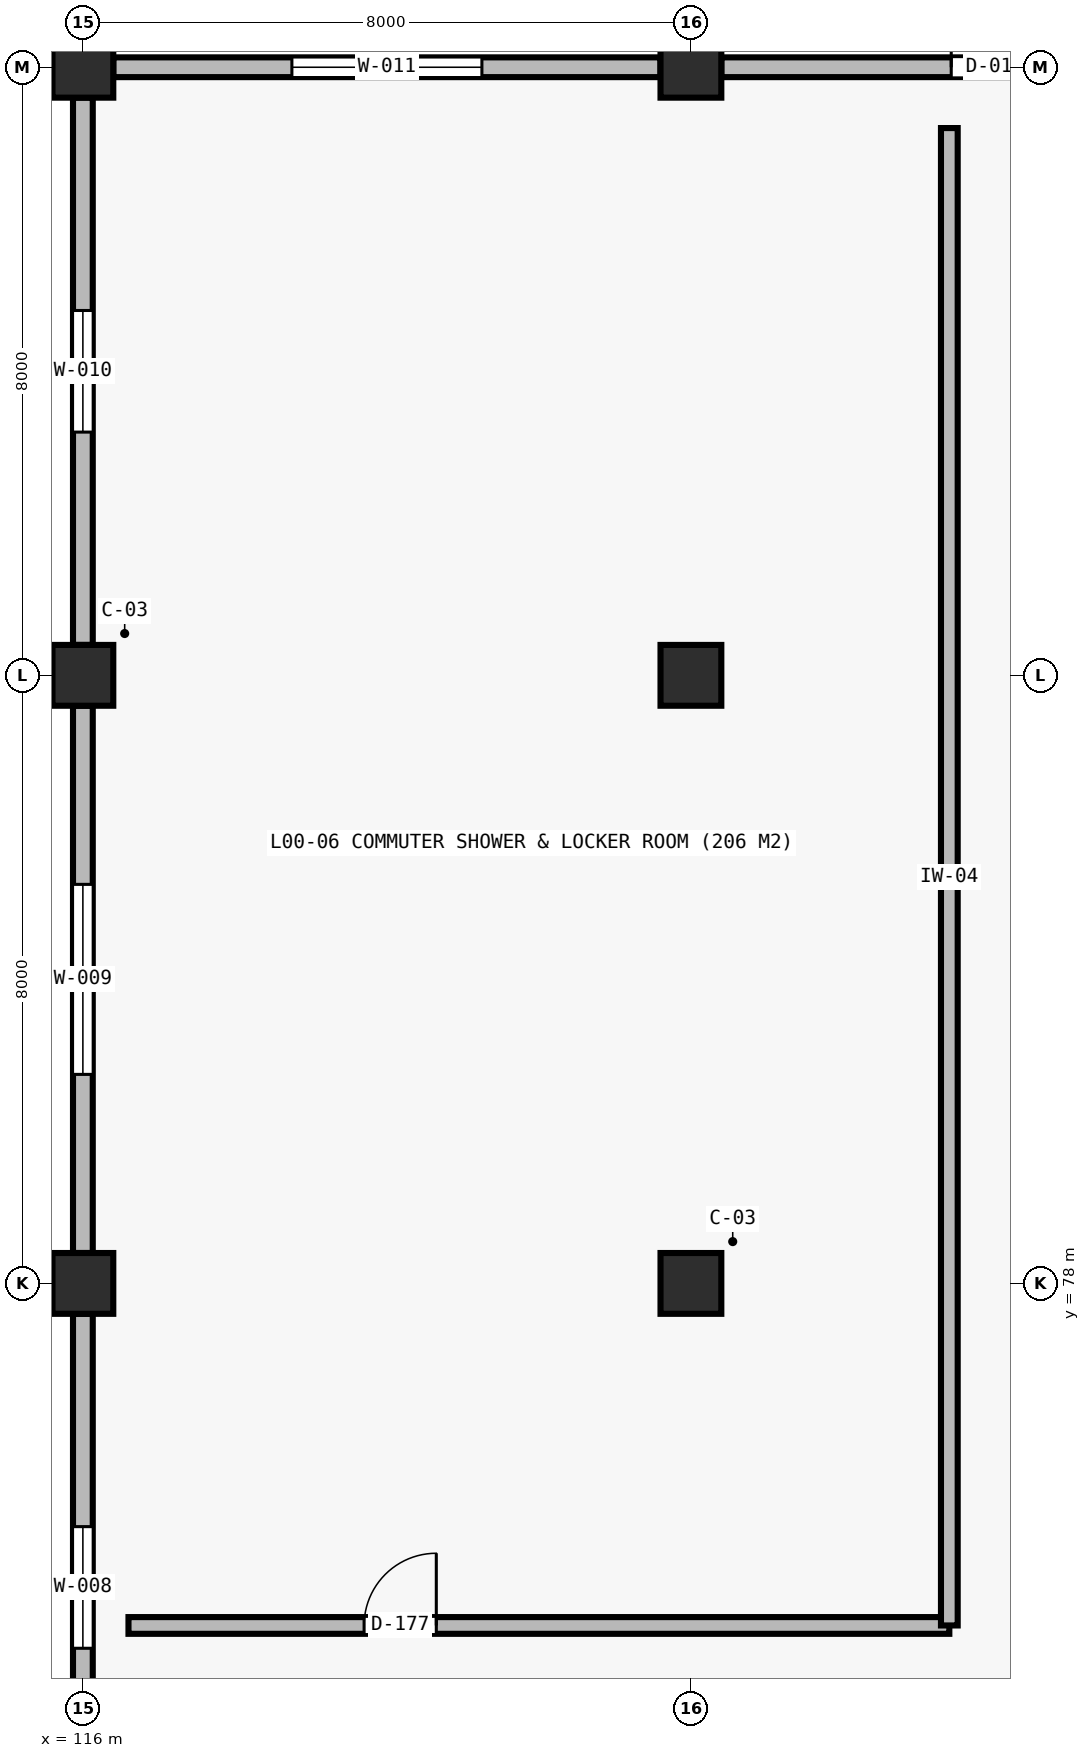
"""IFC4 building model, lengths in metres.
Left out: names, types, materials, properties, quantities, classifications, styles, units other than length and angle.
Written with IfcOpenShell. Run it as: python <this file> out.ifc"""

import sys

from ifc_helpers import new_model, si_unit, direction, frame, frame_2d, origin, origin_2d, place, context, subcontext, project, spatial, rectangle, extrude, element, fill, save


model = new_model("IFC4")
c1 = context("Model", 3, precision=1e-05, world=origin(), true_north=direction((0.0, 1.0)))
c2 = subcontext(c1, "Body", "Model", "MODEL_VIEW")
j1 = project(units=[si_unit("LENGTHUNIT", "METRE"), si_unit("PLANEANGLEUNIT", "RADIAN")], contexts=[c1])
p1 = place(None, origin())
s1 = spatial("IfcSite", under=j1, at=p1, CompositionType="ELEMENT")
p2 = place(p1, origin())
s2 = spatial("IfcBuilding", under=s1, at=p2, CompositionType="ELEMENT")
p3 = place(p2, origin())
s3 = spatial("IfcBuildingStorey", under=s2, at=p3, CompositionType="ELEMENT", Elevation=0.0)
for number, where, z_axis, x_axis in (
    (1, (116.0, 78.0, 0.0), (0.0, 0.0, 1.0), (1.0, 0.0, 0.0)),
    (2, (116.0, 86.0, 0.0), (0.0, 0.0, 1.0), (1.0, 0.0, 0.0)),
    (3, (116.0, 94.0, 0.0), (0.0, 0.0, 1.0), (1.0, 0.0, 0.0)),
    (4, (124.0, 78.0, 0.0), (0.0, 0.0, 1.0), (1.0, 0.0, 0.0)),
    (5, (124.0, 86.0, 0.0), (0.0, 0.0, 1.0), (1.0, 0.0, 0.0)),
    (6, (124.0, 94.0, 0.0), (0.0, 0.0, 1.0), (1.0, 0.0, 0.0)),
):
    element("IfcColumn", number, at=place(p3, frame(where, z_axis=z_axis, x_axis=x_axis)), inside=s3, PredefinedType="COLUMN", context=c2, shape_type="SweptSolid", body=[
        extrude(rectangle(XDim=0.8, YDim=0.8, at=origin_2d()), origin(), (0.0, 0.0, 1.0), 6.02),
    ])
p4 = place(p3, frame((116.0, 70.4, 0.0), z_axis=(0.0, 0.0, 1.0), x_axis=(0.0, 1.0, 0.0)))
e7 = element("IfcWall", 7, at=p4, inside=s3, PredefinedType="STANDARD", context=c2, shape_type="SweptSolid", body=[
    extrude(rectangle(XDim=7.2, YDim=0.26, at=frame_2d((3.6, 0.0))), origin(), (0.0, 0.0, 1.0), 5.408),
])
p5 = place(p4, frame((2.8, 0.0, 0.95)))
e8 = element("IfcOpeningElement", 8, at=p5, cuts=e7, PredefinedType="OPENING", context=c2, shape_type="SweptSolid", body=[
    extrude(rectangle(XDim=1.6, YDim=2.2, at=frame_2d((0.8, 1.1))), frame((0.0, 0.14, 0.0), z_axis=(0.0, -1.0, 0.0), x_axis=(1.0, 0.0, 0.0)), (0.0, 0.0, 1.0), 0.28),
])
p6 = place(p3, frame((116.0, 78.4, 0.0), z_axis=(0.0, 0.0, 1.0), x_axis=(0.0, 1.0, 0.0)))
e9 = element("IfcWall", 9, at=p6, inside=s3, PredefinedType="STANDARD", context=c2, shape_type="SweptSolid", body=[
    extrude(rectangle(XDim=7.2, YDim=0.26, at=frame_2d((3.6, 0.0))), origin(), (0.0, 0.0, 1.0), 5.408),
])
p7 = place(p6, frame((2.35, 0.0, 0.95)))
e10 = element("IfcOpeningElement", 10, at=p7, cuts=e9, PredefinedType="OPENING", context=c2, shape_type="SweptSolid", body=[
    extrude(rectangle(XDim=2.5, YDim=2.05, at=frame_2d((1.25, 1.025))), frame((0.0, 0.14, 0.0), z_axis=(0.0, -1.0, 0.0), x_axis=(1.0, 0.0, 0.0)), (0.0, 0.0, 1.0), 0.28),
])
p8 = place(p3, frame((116.0, 86.4, 0.0), z_axis=(0.0, 0.0, 1.0), x_axis=(0.0, 1.0, 0.0)))
e11 = element("IfcWall", 11, at=p8, inside=s3, PredefinedType="STANDARD", context=c2, shape_type="SweptSolid", body=[
    extrude(rectangle(XDim=7.2, YDim=0.26, at=frame_2d((3.6, 0.0))), origin(), (0.0, 0.0, 1.0), 5.408),
])
p9 = place(p8, frame((2.8, 0.0, 0.95)))
e12 = element("IfcOpeningElement", 12, at=p9, cuts=e11, PredefinedType="OPENING", context=c2, shape_type="SweptSolid", body=[
    extrude(rectangle(XDim=1.6, YDim=2.2, at=frame_2d((0.8, 1.1))), frame((0.0, 0.14, 0.0), z_axis=(0.0, -1.0, 0.0), x_axis=(1.0, 0.0, 0.0)), (0.0, 0.0, 1.0), 0.28),
])
p10 = place(p3, frame((116.4, 94.0, 0.0), z_axis=(0.0, 0.0, 1.0), x_axis=(1.0, 0.0, 0.0)))
e13 = element("IfcWall", 13, at=p10, inside=s3, PredefinedType="STANDARD", context=c2, shape_type="SweptSolid", body=[
    extrude(rectangle(XDim=7.2, YDim=0.26, at=frame_2d((3.6, 0.0))), origin(), (0.0, 0.0, 1.0), 4.92),
])
p11 = place(p10, frame((2.35, 0.0, 0.95)))
e14 = element("IfcOpeningElement", 14, at=p11, cuts=e13, PredefinedType="OPENING", context=c2, shape_type="SweptSolid", body=[
    extrude(rectangle(XDim=2.5, YDim=2.05, at=frame_2d((1.25, 1.025))), frame((0.0, 0.14, 0.0), z_axis=(0.0, -1.0, 0.0), x_axis=(1.0, 0.0, 0.0)), (0.0, 0.0, 1.0), 0.28),
])
p12 = place(p3, frame((124.4, 94.0, 0.0), z_axis=(0.0, 0.0, 1.0), x_axis=(1.0, 0.0, 0.0)))
e15 = element("IfcWall", 15, at=p12, inside=s3, PredefinedType="STANDARD", context=c2, shape_type="SweptSolid", body=[
    extrude(rectangle(XDim=7.2, YDim=0.26, at=frame_2d((3.6, 0.0))), origin(), (0.0, 0.0, 1.0), 4.92),
])
p13 = place(p12, frame((3.025, 0.0, 0.0)))
e16 = element("IfcOpeningElement", 16, at=p13, cuts=e15, PredefinedType="OPENING", context=c2, shape_type="SweptSolid", body=[
    extrude(rectangle(XDim=1.15, YDim=2.2, at=frame_2d((0.575, 1.1))), frame((0.0, 0.14, 0.0), z_axis=(0.0, -1.0, 0.0), x_axis=(1.0, 0.0, 0.0)), (0.0, 0.0, 1.0), 0.28),
])
p14 = place(p3, frame((116.6, 73.5, 0.0), z_axis=(0.0, 0.0, 1.0), x_axis=(1.0, 0.0, 0.0)))
e17 = element("IfcWall", 17, at=p14, inside=s3, PredefinedType="PLUMBINGWALL", context=c2, shape_type="SweptSolid", body=[
    extrude(rectangle(XDim=10.8, YDim=0.22, at=frame_2d((5.4, 0.0))), origin(), (0.0, 0.0, 1.0), 6.02),
])
p15 = place(p14, frame((3.1, 0.0, 0.0)))
e18 = element("IfcOpeningElement", 18, at=p15, cuts=e17, PredefinedType="OPENING", context=c2, shape_type="SweptSolid", body=[
    extrude(rectangle(XDim=0.95, YDim=2.1, at=frame_2d((0.475, 1.05))), frame((0.0, 0.12, 0.0), z_axis=(0.0, -1.0, 0.0), x_axis=(1.0, 0.0, 0.0)), (0.0, 0.0, 1.0), 0.24),
])
p16 = place(p3, frame((127.4, 73.5, 0.0), z_axis=(0.0, 0.0, 1.0), x_axis=(0.0, 1.0, 0.0)))
e19 = element("IfcWall", 19, at=p16, inside=s3, PredefinedType="PLUMBINGWALL", context=c2, shape_type="SweptSolid", body=[
    extrude(rectangle(XDim=19.7, YDim=0.22, at=frame_2d((9.85, 0.0))), origin(), (0.0, 0.0, 1.0), 6.02),
])
p17 = place(p5, origin())
e20 = element("IfcWindow", 20, at=p17, inside=s3, PartitioningType="SINGLE_PANEL", PredefinedType="WINDOW", context=c2, shape_type="SweptSolid", body=[
    extrude(rectangle(XDim=1.6, YDim=2.2, at=frame_2d((0.8, 1.1))), frame((0.0, 0.03, 0.0), z_axis=(0.0, -1.0, 0.0), x_axis=(1.0, 0.0, 0.0)), (0.0, 0.0, 1.0), 0.06),
])
fill(e8, e20)
p18 = place(p7, origin())
e21 = element("IfcWindow", 21, at=p18, inside=s3, PartitioningType="SINGLE_PANEL", PredefinedType="WINDOW", context=c2, shape_type="SweptSolid", body=[
    extrude(rectangle(XDim=2.5, YDim=2.05, at=frame_2d((1.25, 1.025))), frame((0.0, 0.03, 0.0), z_axis=(0.0, -1.0, 0.0), x_axis=(1.0, 0.0, 0.0)), (0.0, 0.0, 1.0), 0.06),
])
fill(e10, e21)
p19 = place(p9, origin())
e22 = element("IfcWindow", 22, at=p19, inside=s3, PartitioningType="SINGLE_PANEL", PredefinedType="WINDOW", context=c2, shape_type="SweptSolid", body=[
    extrude(rectangle(XDim=1.6, YDim=2.2, at=frame_2d((0.8, 1.1))), frame((0.0, 0.03, 0.0), z_axis=(0.0, -1.0, 0.0), x_axis=(1.0, 0.0, 0.0)), (0.0, 0.0, 1.0), 0.06),
])
fill(e12, e22)
p20 = place(p11, origin())
e23 = element("IfcWindow", 23, at=p20, inside=s3, PartitioningType="SINGLE_PANEL", PredefinedType="WINDOW", context=c2, shape_type="SweptSolid", body=[
    extrude(rectangle(XDim=2.5, YDim=2.05, at=frame_2d((1.25, 1.025))), frame((0.0, 0.03, 0.0), z_axis=(0.0, -1.0, 0.0), x_axis=(1.0, 0.0, 0.0)), (0.0, 0.0, 1.0), 0.06),
])
fill(e14, e23)
p21 = place(p13, origin())
e24 = element("IfcDoor", 24, at=p21, inside=s3, OperationType="SINGLE_SWING_LEFT", PredefinedType="DOOR", context=c2, shape_type="SweptSolid", body=[
    extrude(rectangle(XDim=1.15, YDim=2.2, at=frame_2d((0.575, 1.1))), frame((0.0, 0.025, 0.0), z_axis=(0.0, -1.0, 0.0), x_axis=(1.0, 0.0, 0.0)), (0.0, 0.0, 1.0), 0.05),
])
fill(e16, e24)
p22 = place(p15, origin())
e25 = element("IfcDoor", 25, at=p22, inside=s3, OperationType="SINGLE_SWING_RIGHT", PredefinedType="DOOR", context=c2, shape_type="SweptSolid", body=[
    extrude(rectangle(XDim=0.95, YDim=2.1, at=frame_2d((0.475, 1.05))), frame((0.0, 0.025, 0.0), z_axis=(0.0, -1.0, 0.0), x_axis=(1.0, 0.0, 0.0)), (0.0, 0.0, 1.0), 0.05),
])
fill(e18, e25)
save(model, sys.argv[1])
